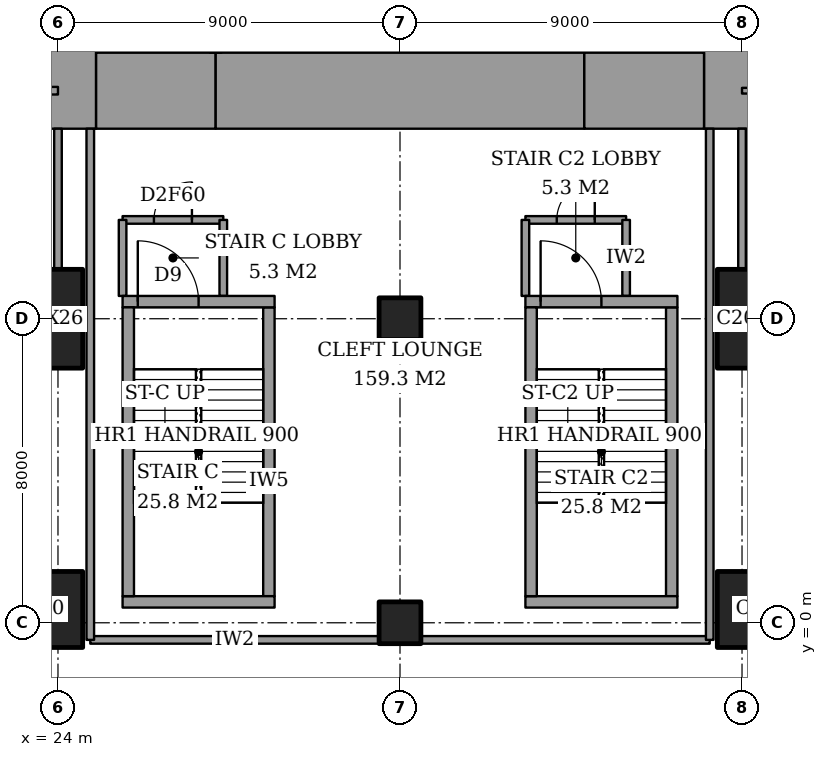
"""IFC4 building model, lengths in metres.
Left out: names, types, materials, properties, quantities, classifications, styles, units other than length and angle.
Written with IfcOpenShell. Run it as: python <this file> out.ifc"""

import sys

from ifc_helpers import new_model, si_unit, direction, frame, frame_2d, origin, origin_2d, place, context, subcontext, project, spatial, rectangle, extrude, element, fill, save


model = new_model("IFC4")
c1 = context("Model", 3, precision=1e-05, world=origin(), true_north=direction((0.0, 1.0)))
c2 = subcontext(c1, "Body", "Model", "MODEL_VIEW")
j1 = project(units=[si_unit("LENGTHUNIT", "METRE"), si_unit("PLANEANGLEUNIT", "RADIAN")], contexts=[c1])
p1 = place(None, origin())
s1 = spatial("IfcSite", under=j1, at=p1, CompositionType="ELEMENT")
p2 = place(p1, origin())
s2 = spatial("IfcBuilding", under=s1, at=p2, CompositionType="ELEMENT")
p3 = place(p2, frame((0.0, 0.0, 11.0)))
s3 = spatial("IfcBuildingStorey", under=s2, at=p3, CompositionType="ELEMENT", Elevation=11.0)
p4 = place(p3, frame((23.65, 0.35, 0.0), z_axis=(0.0, 0.0, 1.0), x_axis=(1.0, 0.0, 0.0)))
e1 = element("IfcColumn", 1, at=p4, inside=s3, PredefinedType="COLUMN", context=c2, shape_type="SweptSolid", body=[
    extrude(rectangle(XDim=2.0, YDim=2.0, at=origin_2d()), origin(), (0.0, 0.0, 1.0), 5.0),
])
p5 = place(p3, frame((23.65, 8.0, 0.0), z_axis=(0.0, 0.0, 1.0), x_axis=(1.0, 0.0, 0.0)))
e2 = element("IfcColumn", 2, at=p5, inside=s3, PredefinedType="COLUMN", context=c2, shape_type="SweptSolid", body=[
    extrude(rectangle(XDim=2.0, YDim=2.6, at=origin_2d()), origin(), (0.0, 0.0, 1.0), 5.0),
])
for number, where, z_axis, x_axis in (
    (3, (33.0, 0.0, 0.0), (0.0, 0.0, 1.0), (1.0, 0.0, 0.0)),
    (4, (33.0, 8.0, 0.0), (0.0, 0.0, 1.0), (1.0, 0.0, 0.0)),
):
    element("IfcColumn", number, at=place(p3, frame(where, z_axis=z_axis, x_axis=x_axis)), inside=s3, PredefinedType="COLUMN", context=c2, shape_type="SweptSolid", body=[
        extrude(rectangle(XDim=1.1, YDim=1.1, at=origin_2d()), origin(), (0.0, 0.0, 1.0), 5.0),
    ])
p6 = place(p3, frame((42.35, 0.35, 0.0), z_axis=(0.0, 0.0, 1.0), x_axis=(1.0, 0.0, 0.0)))
e5 = element("IfcColumn", 5, at=p6, inside=s3, PredefinedType="COLUMN", context=c2, shape_type="SweptSolid", body=[
    extrude(rectangle(XDim=2.0, YDim=2.0, at=origin_2d()), origin(), (0.0, 0.0, 1.0), 5.0),
])
p7 = place(p3, frame((42.35, 8.0, 0.0), z_axis=(0.0, 0.0, 1.0), x_axis=(1.0, 0.0, 0.0)))
e6 = element("IfcColumn", 6, at=p7, inside=s3, PredefinedType="COLUMN", context=c2, shape_type="SweptSolid", body=[
    extrude(rectangle(XDim=2.0, YDim=2.6, at=origin_2d()), origin(), (0.0, 0.0, 1.0), 5.0),
])
p8 = place(p3, frame((25.0, 14.0, 0.0), z_axis=(0.0, 0.0, 1.0), x_axis=(1.0, 0.0, 0.0)))
e7 = element("IfcWall", 7, at=p8, inside=s3, PredefinedType="SHEAR", context=c2, shape_type="SweptSolid", body=[
    extrude(rectangle(XDim=3.15, YDim=2.0, at=frame_2d((1.575, 0.0))), origin(), (0.0, 0.0, 1.0), 5.0),
])
p9 = place(p3, frame((28.15, 14.0, 0.0), z_axis=(0.0, 0.0, 1.0), x_axis=(1.0, 0.0, 0.0)))
e8 = element("IfcWall", 8, at=p9, inside=s3, PredefinedType="SHEAR", context=c2, shape_type="SweptSolid", body=[
    extrude(rectangle(XDim=9.7, YDim=2.0, at=frame_2d((4.85, 0.0))), origin(), (0.0, 0.0, 1.0), 5.0),
])
p10 = place(p3, frame((37.85, 14.0, 0.0), z_axis=(0.0, 0.0, 1.0), x_axis=(1.0, 0.0, 0.0)))
e9 = element("IfcWall", 9, at=p10, inside=s3, PredefinedType="SHEAR", context=c2, shape_type="SweptSolid", body=[
    extrude(rectangle(XDim=3.15, YDim=2.0, at=frame_2d((1.575, 0.0))), origin(), (0.0, 0.0, 1.0), 5.0),
])
p11 = place(p3, frame((24.3, 13.0, 0.0), z_axis=(0.0, 0.0, 1.0), x_axis=(0.0, 1.0, 0.0)))
e10 = element("IfcWall", 10, at=p11, inside=s3, PredefinedType="SHEAR", context=c2, shape_type="SweptSolid", body=[
    extrude(rectangle(XDim=10.15, YDim=1.4, at=frame_2d((5.075, 0.0))), origin(), (0.0, 0.0, 1.0), 5.0),
])
p12 = place(p3, frame((41.7, 13.0, 0.0), z_axis=(0.0, 0.0, 1.0), x_axis=(0.0, 1.0, 0.0)))
e11 = element("IfcWall", 11, at=p12, inside=s3, PredefinedType="SHEAR", context=c2, shape_type="SweptSolid", body=[
    extrude(rectangle(XDim=11.85, YDim=1.4, at=frame_2d((5.925, 0.0))), origin(), (0.0, 0.0, 1.0), 5.0),
])
p13 = place(p12, frame((7.5, 0.0, 0.0)))
e12 = element("IfcOpeningElement", 12, at=p13, cuts=e11, PredefinedType="OPENING", context=c2, shape_type="SweptSolid", body=[
    extrude(rectangle(XDim=1.8, YDim=2.4, at=frame_2d((0.9, 1.2))), frame((0.0, 0.71, 0.0), z_axis=(0.0, -1.0, 0.0), x_axis=(1.0, 0.0, 0.0)), (0.0, 0.0, 1.0), 1.42),
])
for number, where, z_axis, x_axis in (
    (13, (24.85, -0.45, 0.0), (0.0, 0.0, 1.0), (1.0, 0.0, 0.0)),
    (14, (33.55, -0.45, 0.0), (0.0, 0.0, 1.0), (1.0, 0.0, 0.0)),
):
    element("IfcWall", number, at=place(p3, frame(where, z_axis=z_axis, x_axis=x_axis)), inside=s3, PredefinedType="PARTITIONING", context=c2, shape_type="SweptSolid", body=[
        extrude(rectangle(XDim=7.6, YDim=0.2, at=frame_2d((3.8, 0.0))), origin(), (0.0, 0.0, 1.0), 4.7),
    ])
p14 = place(p3, frame((25.7, 10.6, 0.0), z_axis=(0.0, 0.0, 1.0), x_axis=(1.0, 0.0, 0.0)))
e15 = element("IfcWall", 15, at=p14, inside=s3, PredefinedType="PARTITIONING", context=c2, shape_type="SweptSolid", body=[
    extrude(rectangle(XDim=2.65, YDim=0.2, at=frame_2d((1.325, 0.0))), origin(), (0.0, 0.0, 1.0), 4.7),
])
p15 = place(p14, frame((0.825, 0.0, 0.0)))
e16 = element("IfcOpeningElement", 16, at=p15, cuts=e15, PredefinedType="OPENING", context=c2, shape_type="SweptSolid", body=[
    extrude(rectangle(XDim=1.0, YDim=2.1, at=frame_2d((0.5, 1.05))), frame((0.0, 0.11, 0.0), z_axis=(0.0, -1.0, 0.0), x_axis=(1.0, 0.0, 0.0)), (0.0, 0.0, 1.0), 0.22),
])
p16 = place(p3, frame((36.3, 10.6, 0.0), z_axis=(0.0, 0.0, 1.0), x_axis=(1.0, 0.0, 0.0)))
e17 = element("IfcWall", 17, at=p16, inside=s3, PredefinedType="PARTITIONING", context=c2, shape_type="SweptSolid", body=[
    extrude(rectangle(XDim=2.65, YDim=0.2, at=frame_2d((1.325, 0.0))), origin(), (0.0, 0.0, 1.0), 4.7),
])
p17 = place(p16, frame((0.825, 0.0, 0.0)))
e18 = element("IfcOpeningElement", 18, at=p17, cuts=e17, PredefinedType="OPENING", context=c2, shape_type="SweptSolid", body=[
    extrude(rectangle(XDim=1.0, YDim=2.1, at=frame_2d((0.5, 1.05))), frame((0.0, 0.11, 0.0), z_axis=(0.0, -1.0, 0.0), x_axis=(1.0, 0.0, 0.0)), (0.0, 0.0, 1.0), 0.22),
])
p18 = place(p3, frame((14.0, 14.0, 0.0), z_axis=(0.0, 0.0, 1.0), x_axis=(1.0, 0.0, 0.0)))
e19 = element("IfcWall", 19, at=p18, inside=s3, PredefinedType="PARTITIONING", context=c2, shape_type="SweptSolid", body=[
    extrude(rectangle(XDim=10.0, YDim=0.2, at=frame_2d((5.0, 0.0))), origin(), (0.0, 0.0, 1.0), 4.7),
])
p19 = place(p3, frame((42.0, 14.0, 0.0), z_axis=(0.0, 0.0, 1.0), x_axis=(1.0, 0.0, 0.0)))
e20 = element("IfcWall", 20, at=p19, inside=s3, PredefinedType="PARTITIONING", context=c2, shape_type="SweptSolid", body=[
    extrude(rectangle(XDim=32.45, YDim=0.15, at=frame_2d((16.225, 0.0))), origin(), (0.0, 0.0, 1.0), 4.7),
])
p20 = place(p19, frame((11.137, 0.0, 0.0)))
e21 = element("IfcOpeningElement", 21, at=p20, cuts=e20, PredefinedType="OPENING", context=c2, shape_type="SweptSolid", body=[
    extrude(rectangle(XDim=1.0, YDim=2.1, at=frame_2d((0.5, 1.05))), frame((0.0, 0.085, 0.0), z_axis=(0.0, -1.0, 0.0), x_axis=(1.0, 0.0, 0.0)), (0.0, 0.0, 1.0), 0.17),
])
p21 = place(p19, frame((24.663, 0.0, 0.0)))
e22 = element("IfcOpeningElement", 22, at=p21, cuts=e20, PredefinedType="OPENING", context=c2, shape_type="SweptSolid", body=[
    extrude(rectangle(XDim=1.8, YDim=2.1, at=frame_2d((0.9, 1.05))), frame((0.0, 0.085, 0.0), z_axis=(0.0, -1.0, 0.0), x_axis=(1.0, 0.0, 0.0)), (0.0, 0.0, 1.0), 0.17),
])
p22 = place(p3, frame((24.0, 9.3, 0.0), z_axis=(0.0, 0.0, 1.0), x_axis=(0.0, 1.0, 0.0)))
e23 = element("IfcWall", 23, at=p22, inside=s3, PredefinedType="PARTITIONING", context=c2, shape_type="SweptSolid", body=[
    extrude(rectangle(XDim=3.7, YDim=0.2, at=frame_2d((1.85, 0.0))), origin(), (0.0, 0.0, 1.0), 4.7),
])
p23 = place(p3, frame((24.85, -0.45, 0.0), z_axis=(0.0, 0.0, 1.0), x_axis=(0.0, 1.0, 0.0)))
e24 = element("IfcWall", 24, at=p23, inside=s3, PredefinedType="PARTITIONING", context=c2, shape_type="SweptSolid", body=[
    extrude(rectangle(XDim=13.45, YDim=0.2, at=frame_2d((6.725, 0.0))), origin(), (0.0, 0.0, 1.0), 4.7),
])
for number, where, z_axis, x_axis in (
    (25, (25.7, 8.6, 0.0), (0.0, 0.0, 1.0), (0.0, 1.0, 0.0)),
    (26, (28.35, 8.6, 0.0), (0.0, 0.0, 1.0), (0.0, 1.0, 0.0)),
    (27, (36.3, 8.6, 0.0), (0.0, 0.0, 1.0), (0.0, 1.0, 0.0)),
    (28, (38.95, 8.6, 0.0), (0.0, 0.0, 1.0), (0.0, 1.0, 0.0)),
):
    element("IfcWall", number, at=place(p3, frame(where, z_axis=z_axis, x_axis=x_axis)), inside=s3, PredefinedType="PARTITIONING", context=c2, shape_type="SweptSolid", body=[
        extrude(rectangle(XDim=2.0, YDim=0.2, at=frame_2d((1.0, 0.0))), origin(), (0.0, 0.0, 1.0), 4.7),
    ])
p24 = place(p3, frame((41.15, -0.45, 0.0), z_axis=(0.0, 0.0, 1.0), x_axis=(0.0, 1.0, 0.0)))
e29 = element("IfcWall", 29, at=p24, inside=s3, PredefinedType="PARTITIONING", context=c2, shape_type="SweptSolid", body=[
    extrude(rectangle(XDim=13.45, YDim=0.2, at=frame_2d((6.725, 0.0))), origin(), (0.0, 0.0, 1.0), 4.7),
])
p25 = place(p3, frame((42.0, 9.3, 0.0), z_axis=(0.0, 0.0, 1.0), x_axis=(0.0, 1.0, 0.0)))
e30 = element("IfcWall", 30, at=p25, inside=s3, PredefinedType="PARTITIONING", context=c2, shape_type="SweptSolid", body=[
    extrude(rectangle(XDim=3.7, YDim=0.2, at=frame_2d((1.85, 0.0))), origin(), (0.0, 0.0, 1.0), 4.7),
])
for number, where, z_axis, x_axis in (
    (31, (31.4, 15.0, 0.0), (0.0, 0.0, 1.0), (0.0, 1.0, 0.0)),
    (32, (34.6, 15.0, 0.0), (0.0, 0.0, 1.0), (0.0, 1.0, 0.0)),
):
    element("IfcWall", number, at=place(p3, frame(where, z_axis=z_axis, x_axis=x_axis)), inside=s3, PredefinedType="PARTITIONING", context=c2, shape_type="SweptSolid", body=[
        extrude(rectangle(XDim=2.8, YDim=0.2, at=frame_2d((1.4, 0.0))), origin(), (0.0, 0.0, 1.0), 5.0),
    ])
p26 = place(p3, frame((37.85, 15.0, 0.0), z_axis=(0.0, 0.0, 1.0), x_axis=(0.0, 1.0, 0.0)))
e33 = element("IfcWall", 33, at=p26, inside=s3, PredefinedType="SHEAR", context=c2, shape_type="SweptSolid", body=[
    extrude(rectangle(XDim=2.8, YDim=0.3, at=frame_2d((1.4, 0.0))), origin(), (0.0, 0.0, 1.0), 5.0),
])
p27 = place(p3, frame((25.7, 0.55, 0.0), z_axis=(0.0, 0.0, 1.0), x_axis=(1.0, 0.0, 0.0)))
e34 = element("IfcWall", 34, at=p27, inside=s3, PredefinedType="PARTITIONING", context=c2, shape_type="SweptSolid", body=[
    extrude(rectangle(XDim=4.0, YDim=0.3, at=frame_2d((2.0, 0.0))), origin(), (0.0, 0.0, 1.0), 5.0),
])
p28 = place(p3, frame((25.7, 8.45, 0.0), z_axis=(0.0, 0.0, 1.0), x_axis=(1.0, 0.0, 0.0)))
e35 = element("IfcWall", 35, at=p28, inside=s3, PredefinedType="PARTITIONING", context=c2, shape_type="SweptSolid", body=[
    extrude(rectangle(XDim=4.0, YDim=0.3, at=frame_2d((2.0, 0.0))), origin(), (0.0, 0.0, 1.0), 5.0),
])
p29 = place(p28, frame((0.4, 0.0, 0.0)))
e36 = element("IfcOpeningElement", 36, at=p29, cuts=e35, PredefinedType="OPENING", context=c2, shape_type="SweptSolid", body=[
    extrude(rectangle(XDim=1.6, YDim=2.1, at=frame_2d((0.8, 1.05))), frame((0.0, 0.16, 0.0), z_axis=(0.0, -1.0, 0.0), x_axis=(1.0, 0.0, 0.0)), (0.0, 0.0, 1.0), 0.32),
])
for number, where, z_axis, x_axis in (
    (37, (25.85, 0.7, 0.0), (0.0, 0.0, 1.0), (0.0, 1.0, 0.0)),
    (38, (29.55, 0.7, 0.0), (0.0, 0.0, 1.0), (0.0, 1.0, 0.0)),
):
    element("IfcWall", number, at=place(p3, frame(where, z_axis=z_axis, x_axis=x_axis)), inside=s3, PredefinedType="PARTITIONING", context=c2, shape_type="SweptSolid", body=[
        extrude(rectangle(XDim=7.6, YDim=0.3, at=frame_2d((3.8, 0.0))), origin(), (0.0, 0.0, 1.0), 5.0),
    ])
p30 = place(p3, frame((36.3, 0.55, 0.0), z_axis=(0.0, 0.0, 1.0), x_axis=(1.0, 0.0, 0.0)))
e39 = element("IfcWall", 39, at=p30, inside=s3, PredefinedType="PARTITIONING", context=c2, shape_type="SweptSolid", body=[
    extrude(rectangle(XDim=4.0, YDim=0.3, at=frame_2d((2.0, 0.0))), origin(), (0.0, 0.0, 1.0), 5.0),
])
p31 = place(p3, frame((36.3, 8.45, 0.0), z_axis=(0.0, 0.0, 1.0), x_axis=(1.0, 0.0, 0.0)))
e40 = element("IfcWall", 40, at=p31, inside=s3, PredefinedType="PARTITIONING", context=c2, shape_type="SweptSolid", body=[
    extrude(rectangle(XDim=4.0, YDim=0.3, at=frame_2d((2.0, 0.0))), origin(), (0.0, 0.0, 1.0), 5.0),
])
p32 = place(p31, frame((0.4, 0.0, 0.0)))
e41 = element("IfcOpeningElement", 41, at=p32, cuts=e40, PredefinedType="OPENING", context=c2, shape_type="SweptSolid", body=[
    extrude(rectangle(XDim=1.6, YDim=2.1, at=frame_2d((0.8, 1.05))), frame((0.0, 0.16, 0.0), z_axis=(0.0, -1.0, 0.0), x_axis=(1.0, 0.0, 0.0)), (0.0, 0.0, 1.0), 0.32),
])
for number, where, z_axis, x_axis in (
    (42, (36.45, 0.7, 0.0), (0.0, 0.0, 1.0), (0.0, 1.0, 0.0)),
    (43, (40.15, 0.7, 0.0), (0.0, 0.0, 1.0), (0.0, 1.0, 0.0)),
):
    element("IfcWall", number, at=place(p3, frame(where, z_axis=z_axis, x_axis=x_axis)), inside=s3, PredefinedType="PARTITIONING", context=c2, shape_type="SweptSolid", body=[
        extrude(rectangle(XDim=7.6, YDim=0.3, at=frame_2d((3.8, 0.0))), origin(), (0.0, 0.0, 1.0), 5.0),
    ])
p33 = place(p15, origin())
e44 = element("IfcDoor", 44, at=p33, inside=s3, OperationType="SINGLE_SWING_LEFT", PredefinedType="DOOR", context=c2, shape_type="SweptSolid", body=[
    extrude(rectangle(XDim=1.0, YDim=2.1, at=frame_2d((0.5, 1.05))), frame((0.0, 0.025, 0.0), z_axis=(0.0, -1.0, 0.0), x_axis=(1.0, 0.0, 0.0)), (0.0, 0.0, 1.0), 0.05),
])
fill(e16, e44)
p34 = place(p17, origin())
e45 = element("IfcDoor", 45, at=p34, inside=s3, OperationType="SINGLE_SWING_LEFT", PredefinedType="DOOR", context=c2, shape_type="SweptSolid", body=[
    extrude(rectangle(XDim=1.0, YDim=2.1, at=frame_2d((0.5, 1.05))), frame((0.0, 0.025, 0.0), z_axis=(0.0, -1.0, 0.0), x_axis=(1.0, 0.0, 0.0)), (0.0, 0.0, 1.0), 0.05),
])
fill(e18, e45)
p35 = place(p29, origin())
e46 = element("IfcDoor", 46, at=p35, inside=s3, OperationType="DOUBLE_DOOR_SINGLE_SWING", PredefinedType="DOOR", context=c2, shape_type="SweptSolid", body=[
    extrude(rectangle(XDim=1.6, YDim=2.1, at=frame_2d((0.8, 1.05))), frame((0.0, 0.025, 0.0), z_axis=(0.0, -1.0, 0.0), x_axis=(1.0, 0.0, 0.0)), (0.0, 0.0, 1.0), 0.05),
])
fill(e36, e46)
p36 = place(p32, origin())
e47 = element("IfcDoor", 47, at=p36, inside=s3, OperationType="DOUBLE_DOOR_SINGLE_SWING", PredefinedType="DOOR", context=c2, shape_type="SweptSolid", body=[
    extrude(rectangle(XDim=1.6, YDim=2.1, at=frame_2d((0.8, 1.05))), frame((0.0, 0.025, 0.0), z_axis=(0.0, -1.0, 0.0), x_axis=(1.0, 0.0, 0.0)), (0.0, 0.0, 1.0), 0.05),
])
fill(e41, e47)
save(model, sys.argv[1])
